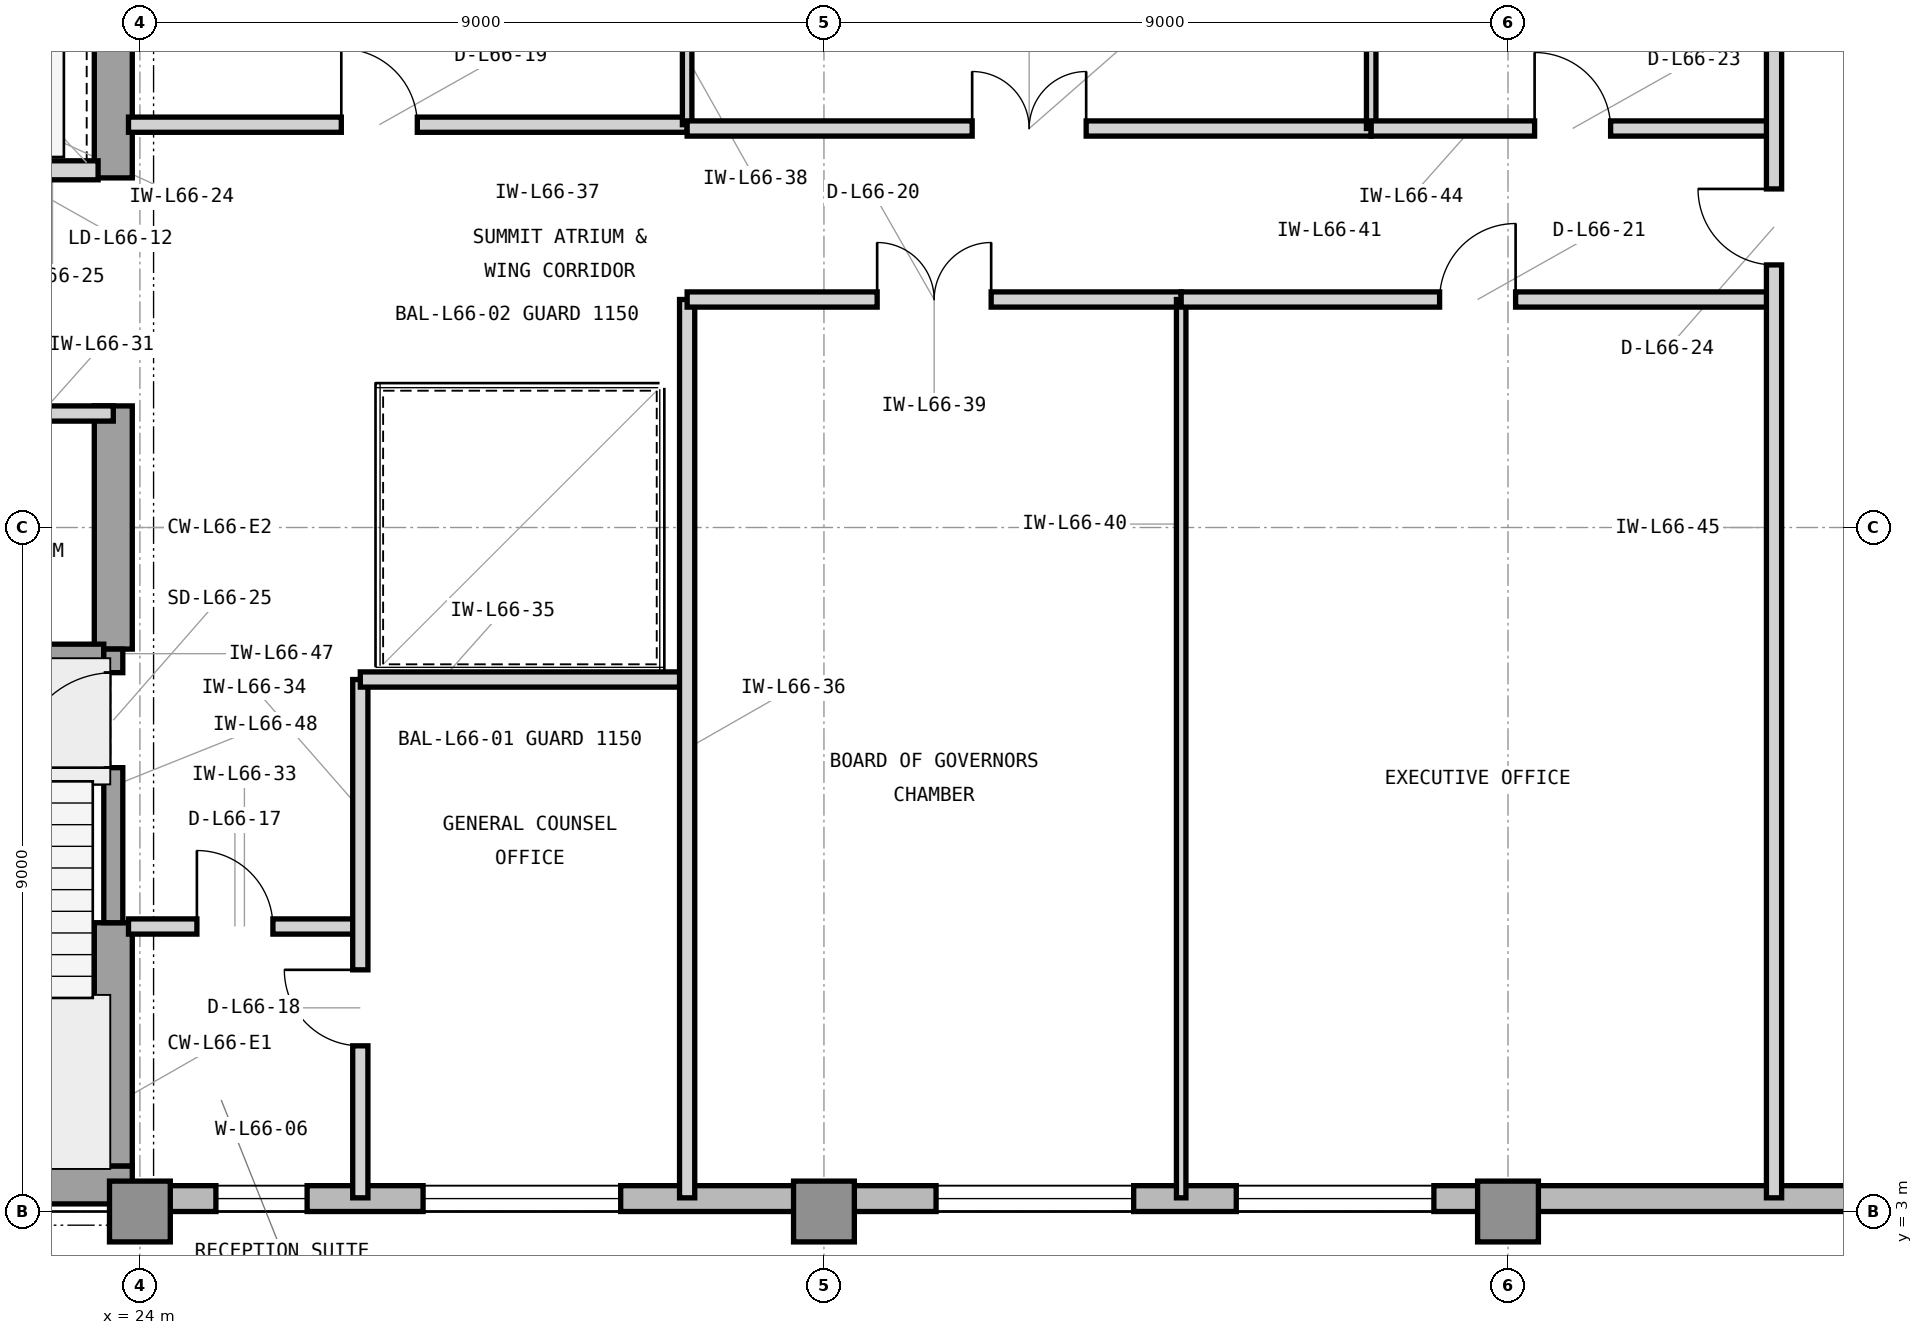
"""IFC4 building model, lengths in metres.
Left out: names, types, materials, properties, quantities, classifications, styles, units other than length and angle.
Written with IfcOpenShell. Run it as: python <this file> out.ifc"""

import sys

from ifc_helpers import new_model, si_unit, direction, frame, frame_2d, origin, origin_2d, place, context, subcontext, project, spatial, rectangle, extrude, element, fill, save


model = new_model("IFC4")
c1 = context("Model", 3, precision=1e-05, world=origin(), true_north=direction((0.0, 1.0)))
c2 = subcontext(c1, "Body", "Model", "MODEL_VIEW")
j1 = project(units=[si_unit("LENGTHUNIT", "METRE"), si_unit("PLANEANGLEUNIT", "RADIAN")], contexts=[c1])
p1 = place(None, origin())
s1 = spatial("IfcSite", under=j1, at=p1, CompositionType="ELEMENT")
p2 = place(p1, origin())
s2 = spatial("IfcBuilding", under=s1, at=p2, CompositionType="ELEMENT")
p3 = place(p2, frame((0.0, 0.0, 270.3)))
s3 = spatial("IfcBuildingStorey", under=s2, at=p3, CompositionType="ELEMENT", Elevation=270.3)
p4 = place(p3, frame((7.475, 3.35, 0.0), z_axis=(0.0, 0.0, 1.0), x_axis=(1.0, 0.0, 0.0)))
e1 = element("IfcWall", 1, at=p4, inside=s3, PredefinedType="SHEAR", context=c2, shape_type="SweptSolid", body=[
    extrude(rectangle(XDim=16.425, YDim=0.5, at=frame_2d((8.212, 0.0))), origin(), (0.0, 0.0, 1.0), 3.9),
])
p5 = place(p3, frame((23.65, 3.6, 0.0), z_axis=(0.0, 0.0, 1.0), x_axis=(0.0, 1.0, 0.0)))
e2 = element("IfcWall", 2, at=p5, inside=s3, PredefinedType="SHEAR", context=c2, shape_type="SweptSolid", body=[
    extrude(rectangle(XDim=3.2, YDim=0.5, at=frame_2d((1.6, 0.0))), origin(), (0.0, 0.0, 1.0), 3.9),
])
p6 = place(p3, frame((23.65, 10.4, 0.0), z_axis=(0.0, 0.0, 1.0), x_axis=(0.0, 1.0, 0.0)))
e3 = element("IfcWall", 3, at=p6, inside=s3, PredefinedType="SHEAR", context=c2, shape_type="SweptSolid", body=[
    extrude(rectangle(XDim=3.2, YDim=0.5, at=frame_2d((1.6, 0.0))), origin(), (0.0, 0.0, 1.0), 3.9),
])
p7 = place(p3, frame((23.65, 16.6, 0.0), z_axis=(0.0, 0.0, 1.0), x_axis=(0.0, 1.0, 0.0)))
e4 = element("IfcWall", 4, at=p7, inside=s3, PredefinedType="SHEAR", context=c2, shape_type="SweptSolid", body=[
    extrude(rectangle(XDim=4.05, YDim=0.5, at=frame_2d((2.025, 0.0))), origin(), (0.0, 0.0, 1.0), 3.9),
])
for number, where, z_axis, x_axis in (
    (5, (24.0, 3.0, 0.0), (0.0, 0.0, 1.0), (1.0, 0.0, 0.0)),
    (6, (33.0, 3.0, 0.0), (0.0, 0.0, 1.0), (1.0, 0.0, 0.0)),
    (7, (42.0, 3.0, 0.0), (0.0, 0.0, 1.0), (1.0, 0.0, 0.0)),
):
    element("IfcColumn", number, at=place(p3, frame(where, z_axis=z_axis, x_axis=x_axis)), inside=s3, PredefinedType="COLUMN", context=c2, shape_type="SweptSolid", body=[
        extrude(rectangle(XDim=0.8, YDim=0.8, at=origin_2d()), origin(), (0.0, 0.0, 1.0), 3.9),
    ])
p8 = place(p3, frame((23.9, 3.17, 0.0), z_axis=(0.0, 0.0, 1.0), x_axis=(1.0, 0.0, 0.0)))
e8 = element("IfcWall", 8, at=p8, inside=s3, PredefinedType="STANDARD", context=c2, shape_type="SweptSolid", body=[
    extrude(rectangle(XDim=28.5, YDim=0.34, at=frame_2d((14.25, 0.0))), origin(), (0.0, 0.0, 1.0), 3.715),
])
p9 = place(p8, frame((10.575, 0.0, 0.8)))
e9 = element("IfcOpeningElement", 9, at=p9, cuts=e8, PredefinedType="OPENING", context=c2, shape_type="SweptSolid", body=[
    extrude(rectangle(XDim=2.6, YDim=2.35, at=frame_2d((1.3, 1.175))), frame((0.0, 0.18, 0.0), z_axis=(0.0, -1.0, 0.0), x_axis=(1.0, 0.0, 0.0)), (0.0, 0.0, 1.0), 0.36),
])
p10 = place(p8, frame((1.1, 0.0, 0.8)))
e10 = element("IfcOpeningElement", 10, at=p10, cuts=e8, PredefinedType="OPENING", context=c2, shape_type="SweptSolid", body=[
    extrude(rectangle(XDim=1.2, YDim=2.35, at=frame_2d((0.6, 1.175))), frame((0.0, 0.18, 0.0), z_axis=(0.0, -1.0, 0.0), x_axis=(1.0, 0.0, 0.0)), (0.0, 0.0, 1.0), 0.36),
])
p11 = place(p8, frame((3.826, 0.0, 0.8)))
e11 = element("IfcOpeningElement", 11, at=p11, cuts=e8, PredefinedType="OPENING", context=c2, shape_type="SweptSolid", body=[
    extrude(rectangle(XDim=2.6, YDim=2.35, at=frame_2d((1.3, 1.175))), frame((0.0, 0.18, 0.0), z_axis=(0.0, -1.0, 0.0), x_axis=(1.0, 0.0, 0.0)), (0.0, 0.0, 1.0), 0.36),
])
p12 = place(p8, frame((14.525, 0.0, 0.8)))
e12 = element("IfcOpeningElement", 12, at=p12, cuts=e8, PredefinedType="OPENING", context=c2, shape_type="SweptSolid", body=[
    extrude(rectangle(XDim=2.6, YDim=2.35, at=frame_2d((1.3, 1.175))), frame((0.0, 0.18, 0.0), z_axis=(0.0, -1.0, 0.0), x_axis=(1.0, 0.0, 0.0)), (0.0, 0.0, 1.0), 0.36),
])
p13 = place(p3, frame((21.05, 16.7, 0.0), z_axis=(0.0, 0.0, 1.0), x_axis=(1.0, 0.0, 0.0)))
e13 = element("IfcWall", 13, at=p13, inside=s3, PredefinedType="PARTITIONING", context=c2, shape_type="SweptSolid", body=[
    extrude(rectangle(XDim=2.4, YDim=0.25, at=frame_2d((1.2, 0.0))), origin(), (0.0, 0.0, 1.0), 3.088),
])
p14 = place(p13, frame((0.52, 0.0, 0.0)))
e14 = element("IfcOpeningElement", 14, at=p14, cuts=e13, PredefinedType="OPENING", context=c2, shape_type="SweptSolid", body=[
    extrude(rectangle(XDim=1.15, YDim=2.25, at=frame_2d((0.575, 1.125))), frame((0.0, 0.135, 0.0), z_axis=(0.0, -1.0, 0.0), x_axis=(1.0, 0.0, 0.0)), (0.0, 0.0, 1.0), 0.27),
])
p15 = place(p3, frame((19.85, 13.5, 0.0), z_axis=(0.0, 0.0, 1.0), x_axis=(1.0, 0.0, 0.0)))
e15 = element("IfcWall", 15, at=p15, inside=s3, PredefinedType="PARTITIONING", context=c2, shape_type="SweptSolid", body=[
    extrude(rectangle(XDim=3.8, YDim=0.2, at=frame_2d((1.9, 0.0))), origin(), (0.0, 0.0, 1.0), 3.088),
])
p16 = place(p15, frame((1.425, 0.0, 0.0)))
e16 = element("IfcOpeningElement", 16, at=p16, cuts=e15, PredefinedType="OPENING", context=c2, shape_type="SweptSolid", body=[
    extrude(rectangle(XDim=0.95, YDim=2.1, at=frame_2d((0.475, 1.05))), frame((0.0, 0.11, 0.0), z_axis=(0.0, -1.0, 0.0), x_axis=(1.0, 0.0, 0.0)), (0.0, 0.0, 1.0), 0.22),
])
p17 = place(p3, frame((23.85, 6.75, 0.0), z_axis=(0.0, 0.0, 1.0), x_axis=(1.0, 0.0, 0.0)))
e17 = element("IfcWall", 17, at=p17, inside=s3, PredefinedType="PARTITIONING", context=c2, shape_type="SweptSolid", body=[
    extrude(rectangle(XDim=3.05, YDim=0.2, at=frame_2d((1.525, 0.0))), origin(), (0.0, 0.0, 1.0), 3.705),
])
p18 = place(p17, frame((0.9, 0.0, 0.0)))
e18 = element("IfcOpeningElement", 18, at=p18, cuts=e17, PredefinedType="OPENING", context=c2, shape_type="SweptSolid", body=[
    extrude(rectangle(XDim=1.0, YDim=2.15, at=frame_2d((0.5, 1.075))), frame((0.0, 0.11, 0.0), z_axis=(0.0, -1.0, 0.0), x_axis=(1.0, 0.0, 0.0)), (0.0, 0.0, 1.0), 0.22),
])
p19 = place(p3, frame((26.9, 3.18, 0.0), z_axis=(0.0, 0.0, 1.0), x_axis=(0.0, 1.0, 0.0)))
e19 = element("IfcWall", 19, at=p19, inside=s3, PredefinedType="PARTITIONING", context=c2, shape_type="SweptSolid", body=[
    extrude(rectangle(XDim=6.82, YDim=0.2, at=frame_2d((3.41, 0.0))), origin(), (0.0, 0.0, 1.0), 3.705),
])
p20 = place(p19, frame((2.0, 0.0, 0.0)))
e20 = element("IfcOpeningElement", 20, at=p20, cuts=e19, PredefinedType="OPENING", context=c2, shape_type="SweptSolid", body=[
    extrude(rectangle(XDim=1.0, YDim=2.15, at=frame_2d((0.5, 1.075))), frame((0.0, 0.11, 0.0), z_axis=(0.0, -1.0, 0.0), x_axis=(1.0, 0.0, 0.0)), (0.0, 0.0, 1.0), 0.22),
])
p21 = place(p3, frame((26.9, 10.0, 0.0), z_axis=(0.0, 0.0, 1.0), x_axis=(1.0, 0.0, 0.0)))
e21 = element("IfcWall", 21, at=p21, inside=s3, PredefinedType="PARTITIONING", context=c2, shape_type="SweptSolid", body=[
    extrude(rectangle(XDim=4.3, YDim=0.2, at=frame_2d((2.15, 0.0))), origin(), (0.0, 0.0, 1.0), 3.705),
])
p22 = place(p3, frame((31.2, 3.18, 0.0), z_axis=(0.0, 0.0, 1.0), x_axis=(0.0, 1.0, 0.0)))
e22 = element("IfcWall", 22, at=p22, inside=s3, PredefinedType="PARTITIONING", context=c2, shape_type="SweptSolid", body=[
    extrude(rectangle(XDim=11.82, YDim=0.2, at=frame_2d((5.91, 0.0))), origin(), (0.0, 0.0, 1.0), 3.705),
])
p23 = place(p3, frame((23.85, 17.3, 0.0), z_axis=(0.0, 0.0, 1.0), x_axis=(1.0, 0.0, 0.0)))
e23 = element("IfcWall", 23, at=p23, inside=s3, PredefinedType="PARTITIONING", context=c2, shape_type="SweptSolid", body=[
    extrude(rectangle(XDim=7.35, YDim=0.2, at=frame_2d((3.675, 0.0))), origin(), (0.0, 0.0, 1.0), 3.705),
])
p24 = place(p23, frame((2.8, 0.0, 0.0)))
e24 = element("IfcOpeningElement", 24, at=p24, cuts=e23, PredefinedType="OPENING", context=c2, shape_type="SweptSolid", body=[
    extrude(rectangle(XDim=1.0, YDim=2.15, at=frame_2d((0.5, 1.075))), frame((0.0, 0.11, 0.0), z_axis=(0.0, -1.0, 0.0), x_axis=(1.0, 0.0, 0.0)), (0.0, 0.0, 1.0), 0.22),
])
p25 = place(p3, frame((31.2, 17.3, 0.0), z_axis=(0.0, 0.0, 1.0), x_axis=(0.0, 1.0, 0.0)))
e25 = element("IfcWall", 25, at=p25, inside=s3, PredefinedType="PARTITIONING", context=c2, shape_type="SweptSolid", body=[
    extrude(rectangle(XDim=3.52, YDim=0.125, at=frame_2d((1.76, 0.0))), origin(), (0.0, 0.0, 1.0), 3.705),
])
p26 = place(p3, frame((31.2, 15.0, 0.0), z_axis=(0.0, 0.0, 1.0), x_axis=(1.0, 0.0, 0.0)))
e26 = element("IfcWall", 26, at=p26, inside=s3, PredefinedType="PARTITIONING", context=c2, shape_type="SweptSolid", body=[
    extrude(rectangle(XDim=6.5, YDim=0.2, at=frame_2d((3.25, 0.0))), origin(), (0.0, 0.0, 1.0), 3.301),
])
p27 = place(p26, frame((2.5, 0.0, 0.0)))
e27 = element("IfcOpeningElement", 27, at=p27, cuts=e26, PredefinedType="OPENING", context=c2, shape_type="SweptSolid", body=[
    extrude(rectangle(XDim=1.5, YDim=2.3, at=frame_2d((0.75, 1.15))), frame((0.0, 0.11, 0.0), z_axis=(0.0, -1.0, 0.0), x_axis=(1.0, 0.0, 0.0)), (0.0, 0.0, 1.0), 0.22),
])
p28 = place(p3, frame((37.7, 3.18, 0.0), z_axis=(0.0, 0.0, 1.0), x_axis=(0.0, 1.0, 0.0)))
e28 = element("IfcWall", 28, at=p28, inside=s3, PredefinedType="PARTITIONING", context=c2, shape_type="SweptSolid", body=[
    extrude(rectangle(XDim=11.82, YDim=0.125, at=frame_2d((5.91, 0.0))), origin(), (0.0, 0.0, 1.0), 3.705),
])
p29 = place(p3, frame((37.7, 15.0, 0.0), z_axis=(0.0, 0.0, 1.0), x_axis=(1.0, 0.0, 0.0)))
e29 = element("IfcWall", 29, at=p29, inside=s3, PredefinedType="PARTITIONING", context=c2, shape_type="SweptSolid", body=[
    extrude(rectangle(XDim=7.8, YDim=0.2, at=frame_2d((3.9, 0.0))), origin(), (0.0, 0.0, 1.0), 3.301),
])
p30 = place(p29, frame((3.4, 0.0, 0.0)))
e30 = element("IfcOpeningElement", 30, at=p30, cuts=e29, PredefinedType="OPENING", context=c2, shape_type="SweptSolid", body=[
    extrude(rectangle(XDim=1.0, YDim=2.15, at=frame_2d((0.5, 1.075))), frame((0.0, 0.11, 0.0), z_axis=(0.0, -1.0, 0.0), x_axis=(1.0, 0.0, 0.0)), (0.0, 0.0, 1.0), 0.22),
])
p31 = place(p3, frame((31.2, 17.25, 0.0), z_axis=(0.0, 0.0, 1.0), x_axis=(1.0, 0.0, 0.0)))
e31 = element("IfcWall", 31, at=p31, inside=s3, PredefinedType="PARTITIONING", context=c2, shape_type="SweptSolid", body=[
    extrude(rectangle(XDim=9.0, YDim=0.2, at=frame_2d((4.5, 0.0))), origin(), (0.0, 0.0, 1.0), 3.705),
])
p32 = place(p31, frame((3.75, 0.0, 0.0)))
e32 = element("IfcOpeningElement", 32, at=p32, cuts=e31, PredefinedType="OPENING", context=c2, shape_type="SweptSolid", body=[
    extrude(rectangle(XDim=1.5, YDim=2.3, at=frame_2d((0.75, 1.15))), frame((0.0, 0.11, 0.0), z_axis=(0.0, -1.0, 0.0), x_axis=(1.0, 0.0, 0.0)), (0.0, 0.0, 1.0), 0.22),
])
p33 = place(p3, frame((40.2, 17.25, 0.0), z_axis=(0.0, 0.0, 1.0), x_axis=(0.0, 1.0, 0.0)))
e33 = element("IfcWall", 33, at=p33, inside=s3, PredefinedType="PARTITIONING", context=c2, shape_type="SweptSolid", body=[
    extrude(rectangle(XDim=3.57, YDim=0.125, at=frame_2d((1.785, 0.0))), origin(), (0.0, 0.0, 1.0), 3.705),
])
p34 = place(p3, frame((40.2, 17.25, 0.0), z_axis=(0.0, 0.0, 1.0), x_axis=(1.0, 0.0, 0.0)))
e34 = element("IfcWall", 34, at=p34, inside=s3, PredefinedType="PARTITIONING", context=c2, shape_type="SweptSolid", body=[
    extrude(rectangle(XDim=5.3, YDim=0.2, at=frame_2d((2.65, 0.0))), origin(), (0.0, 0.0, 1.0), 3.705),
])
p35 = place(p34, frame((2.15, 0.0, 0.0)))
e35 = element("IfcOpeningElement", 35, at=p35, cuts=e34, PredefinedType="OPENING", context=c2, shape_type="SweptSolid", body=[
    extrude(rectangle(XDim=1.0, YDim=2.15, at=frame_2d((0.5, 1.075))), frame((0.0, 0.11, 0.0), z_axis=(0.0, -1.0, 0.0), x_axis=(1.0, 0.0, 0.0)), (0.0, 0.0, 1.0), 0.22),
])
p36 = place(p3, frame((45.5, 3.18, 0.0), z_axis=(0.0, 0.0, 1.0), x_axis=(0.0, 1.0, 0.0)))
e36 = element("IfcWall", 36, at=p36, inside=s3, PredefinedType="PARTITIONING", context=c2, shape_type="SweptSolid", body=[
    extrude(rectangle(XDim=17.64, YDim=0.2, at=frame_2d((8.82, 0.0))), origin(), (0.0, 0.0, 1.0), 3.705),
])
p37 = place(p36, frame((12.275, 0.0, 0.0)))
e37 = element("IfcOpeningElement", 37, at=p37, cuts=e36, PredefinedType="OPENING", context=c2, shape_type="SweptSolid", body=[
    extrude(rectangle(XDim=1.0, YDim=2.15, at=frame_2d((0.5, 1.075))), frame((0.0, 0.11, 0.0), z_axis=(0.0, -1.0, 0.0), x_axis=(1.0, 0.0, 0.0)), (0.0, 0.0, 1.0), 0.22),
])
p38 = place(p3, frame((19.705, 10.34, 0.0), z_axis=(0.0, 0.0, 1.0), x_axis=(1.0, 0.0, 0.0)))
e38 = element("IfcWall", 38, at=p38, inside=s3, PredefinedType="SHEAR", context=c2, shape_type="SweptSolid", body=[
    extrude(rectangle(XDim=3.82, YDim=0.25, at=frame_2d((1.91, 0.0))), origin(), (0.0, 0.0, 1.0), 3.9),
])
p39 = place(p3, frame((23.65, 6.8, 0.0), z_axis=(0.0, 0.0, 1.0), x_axis=(0.0, 1.0, 0.0)))
e39 = element("IfcWall", 39, at=p39, inside=s3, PredefinedType="SHEAR", context=c2, shape_type="SweptSolid", body=[
    extrude(rectangle(XDim=3.6, YDim=0.25, at=frame_2d((1.8, 0.0))), origin(), (0.0, 0.0, 1.0), 3.9),
])
p40 = place(p39, frame((2.04, 0.0, 0.0)))
e40 = element("IfcOpeningElement", 40, at=p40, cuts=e39, PredefinedType="OPENING", context=c2, shape_type="SweptSolid", body=[
    extrude(rectangle(XDim=1.25, YDim=2.2, at=frame_2d((0.625, 1.1))), frame((0.0, 0.135, 0.0), z_axis=(0.0, -1.0, 0.0), x_axis=(1.0, 0.0, 0.0)), (0.0, 0.0, 1.0), 0.27),
])
p41 = place(p9, origin())
e41 = element("IfcWindow", 41, at=p41, inside=s3, PartitioningType="SINGLE_PANEL", PredefinedType="WINDOW", context=c2, shape_type="SweptSolid", body=[
    extrude(rectangle(XDim=2.6, YDim=2.35, at=frame_2d((1.3, 1.175))), frame((0.0, 0.11, 0.0), z_axis=(0.0, -1.0, 0.0), x_axis=(1.0, 0.0, 0.0)), (0.0, 0.0, 1.0), 0.06),
])
fill(e9, e41)
p42 = place(p18, origin())
e42 = element("IfcDoor", 42, at=p42, inside=s3, OperationType="SINGLE_SWING_LEFT", PredefinedType="DOOR", context=c2, shape_type="SweptSolid", body=[
    extrude(rectangle(XDim=1.0, YDim=2.15, at=frame_2d((0.5, 1.075))), frame((0.0, 0.025, 0.0), z_axis=(0.0, -1.0, 0.0), x_axis=(1.0, 0.0, 0.0)), (0.0, 0.0, 1.0), 0.05),
])
fill(e18, e42)
p43 = place(p20, origin())
e43 = element("IfcDoor", 43, at=p43, inside=s3, OperationType="SINGLE_SWING_RIGHT", PredefinedType="DOOR", context=c2, shape_type="SweptSolid", body=[
    extrude(rectangle(XDim=1.0, YDim=2.15, at=frame_2d((0.5, 1.075))), frame((0.0, 0.025, 0.0), z_axis=(0.0, -1.0, 0.0), x_axis=(1.0, 0.0, 0.0)), (0.0, 0.0, 1.0), 0.05),
])
fill(e20, e43)
p44 = place(p24, origin())
e44 = element("IfcDoor", 44, at=p44, inside=s3, OperationType="SINGLE_SWING_LEFT", PredefinedType="DOOR", context=c2, shape_type="SweptSolid", body=[
    extrude(rectangle(XDim=1.0, YDim=2.15, at=frame_2d((0.5, 1.075))), frame((0.0, 0.025, 0.0), z_axis=(0.0, -1.0, 0.0), x_axis=(1.0, 0.0, 0.0)), (0.0, 0.0, 1.0), 0.05),
])
fill(e24, e44)
p45 = place(p27, origin())
e45 = element("IfcDoor", 45, at=p45, inside=s3, OperationType="DOUBLE_DOOR_SINGLE_SWING", PredefinedType="DOOR", context=c2, shape_type="SweptSolid", body=[
    extrude(rectangle(XDim=1.5, YDim=2.3, at=frame_2d((0.75, 1.15))), frame((0.0, 0.025, 0.0), z_axis=(0.0, -1.0, 0.0), x_axis=(1.0, 0.0, 0.0)), (0.0, 0.0, 1.0), 0.05),
])
fill(e27, e45)
p46 = place(p30, origin())
e46 = element("IfcDoor", 46, at=p46, inside=s3, OperationType="SINGLE_SWING_RIGHT", PredefinedType="DOOR", context=c2, shape_type="SweptSolid", body=[
    extrude(rectangle(XDim=1.0, YDim=2.15, at=frame_2d((0.5, 1.075))), frame((0.0, 0.025, 0.0), z_axis=(0.0, -1.0, 0.0), x_axis=(1.0, 0.0, 0.0)), (0.0, 0.0, 1.0), 0.05),
])
fill(e30, e46)
p47 = place(p32, origin())
e47 = element("IfcDoor", 47, at=p47, inside=s3, OperationType="DOUBLE_DOOR_SINGLE_SWING", PredefinedType="DOOR", context=c2, shape_type="SweptSolid", body=[
    extrude(rectangle(XDim=1.5, YDim=2.3, at=frame_2d((0.75, 1.15))), frame((0.0, 0.025, 0.0), z_axis=(0.0, -1.0, 0.0), x_axis=(1.0, 0.0, 0.0)), (0.0, 0.0, 1.0), 0.05),
])
fill(e32, e47)
p48 = place(p35, origin())
e48 = element("IfcDoor", 48, at=p48, inside=s3, OperationType="SINGLE_SWING_LEFT", PredefinedType="DOOR", context=c2, shape_type="SweptSolid", body=[
    extrude(rectangle(XDim=1.0, YDim=2.15, at=frame_2d((0.5, 1.075))), frame((0.0, 0.025, 0.0), z_axis=(0.0, -1.0, 0.0), x_axis=(1.0, 0.0, 0.0)), (0.0, 0.0, 1.0), 0.05),
])
fill(e35, e48)
p49 = place(p37, origin())
e49 = element("IfcDoor", 49, at=p49, inside=s3, OperationType="SINGLE_SWING_RIGHT", PredefinedType="DOOR", context=c2, shape_type="SweptSolid", body=[
    extrude(rectangle(XDim=1.0, YDim=2.15, at=frame_2d((0.5, 1.075))), frame((0.0, 0.025, 0.0), z_axis=(0.0, -1.0, 0.0), x_axis=(1.0, 0.0, 0.0)), (0.0, 0.0, 1.0), 0.05),
])
fill(e37, e49)
p50 = place(p40, origin())
e50 = element("IfcDoor", 50, at=p50, inside=s3, OperationType="SINGLE_SWING_LEFT", PredefinedType="DOOR", context=c2, shape_type="SweptSolid", body=[
    extrude(rectangle(XDim=1.25, YDim=2.2, at=frame_2d((0.625, 1.1))), frame((0.0, 0.025, 0.0), z_axis=(0.0, -1.0, 0.0), x_axis=(1.0, 0.0, 0.0)), (0.0, 0.0, 1.0), 0.05),
])
fill(e40, e50)
p51 = place(p10, origin())
e51 = element("IfcWindow", 51, at=p51, inside=s3, PartitioningType="SINGLE_PANEL", PredefinedType="WINDOW", context=c2, shape_type="SweptSolid", body=[
    extrude(rectangle(XDim=1.2, YDim=2.35, at=frame_2d((0.6, 1.175))), frame((0.0, 0.11, 0.0), z_axis=(0.0, -1.0, 0.0), x_axis=(1.0, 0.0, 0.0)), (0.0, 0.0, 1.0), 0.06),
])
fill(e10, e51)
p52 = place(p11, origin())
e52 = element("IfcWindow", 52, at=p52, inside=s3, PartitioningType="SINGLE_PANEL", PredefinedType="WINDOW", context=c2, shape_type="SweptSolid", body=[
    extrude(rectangle(XDim=2.6, YDim=2.35, at=frame_2d((1.3, 1.175))), frame((0.0, 0.11, 0.0), z_axis=(0.0, -1.0, 0.0), x_axis=(1.0, 0.0, 0.0)), (0.0, 0.0, 1.0), 0.06),
])
fill(e11, e52)
p53 = place(p12, origin())
e53 = element("IfcWindow", 53, at=p53, inside=s3, PartitioningType="SINGLE_PANEL", PredefinedType="WINDOW", context=c2, shape_type="SweptSolid", body=[
    extrude(rectangle(XDim=2.6, YDim=2.35, at=frame_2d((1.3, 1.175))), frame((0.0, 0.11, 0.0), z_axis=(0.0, -1.0, 0.0), x_axis=(1.0, 0.0, 0.0)), (0.0, 0.0, 1.0), 0.06),
])
fill(e12, e53)
save(model, sys.argv[1])
